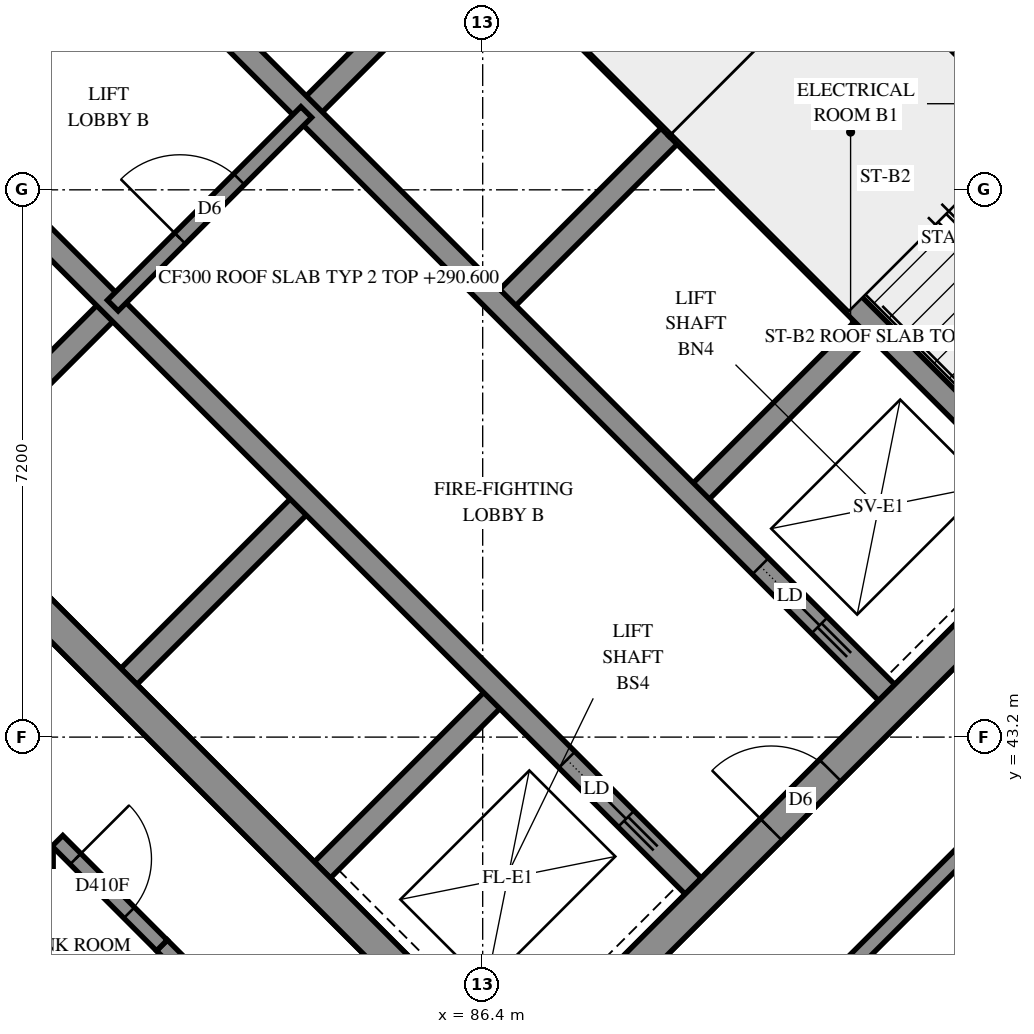
"""IFC4 building model, lengths in metres.
Left out: names, types, materials, properties, quantities, classifications, styles, units other than length and angle.
Written with IfcOpenShell. Run it as: python <this file> out.ifc"""

import sys

from ifc_helpers import new_model, si_unit, direction, frame, frame_2d, origin, place, context, subcontext, project, spatial, polyline, rectangle, outline, extrude, element, fill, save


model = new_model("IFC4")
c1 = context("Model", 3, precision=1e-05, world=origin(), true_north=direction((0.0, 1.0)))
c2 = subcontext(c1, "Body", "Model", "MODEL_VIEW")
j1 = project(units=[si_unit("LENGTHUNIT", "METRE"), si_unit("PLANEANGLEUNIT", "RADIAN")], contexts=[c1])
p1 = place(None, origin())
s1 = spatial("IfcSite", under=j1, at=p1, CompositionType="ELEMENT")
p2 = place(p1, origin())
s2 = spatial("IfcBuilding", under=s1, at=p2, CompositionType="ELEMENT")
p3 = place(p2, frame((0.0, 0.0, 290.6)))
s3 = spatial("IfcBuildingStorey", under=s2, at=p3, CompositionType="ELEMENT", Elevation=290.6)
p4 = place(p3, frame((76.23, 49.231, -0.3), z_axis=(0.0, 0.0, 1.0), x_axis=(0.7071034917, -0.7071100706, 0.0)))
e1 = element("IfcWall", 1, at=p4, inside=s3, PredefinedType="SHEAR", context=c2, shape_type="SweptSolid", body=[
    extrude(rectangle(XDim=15.2, YDim=0.4, at=frame_2d((7.6, 0.0))), origin(), (0.0, 0.0, 1.0), 3.1),
])
p5 = place(p3, frame((86.695, 59.696, -0.3), z_axis=(0.0, 0.0, 1.0), x_axis=(0.7071100706, -0.7071034917, 0.0)))
e2 = element("IfcWall", 2, at=p5, inside=s3, PredefinedType="SHEAR", context=c2, shape_type="SweptSolid", body=[
    extrude(rectangle(XDim=15.2, YDim=0.4, at=frame_2d((7.6, 0.0))), origin(), (0.0, 0.0, 1.0), 3.1),
])
p6 = place(p5, frame((10.4, 0.0, 0.3)))
e3 = element("IfcOpeningElement", 3, at=p6, cuts=e2, PredefinedType="OPENING", context=c2, shape_type="SweptSolid", body=[
    extrude(rectangle(XDim=0.8, YDim=2.1, at=frame_2d((0.4, 1.05))), frame((0.0, 0.21, 0.0), z_axis=(0.0, -1.0, 0.0), x_axis=(1.0, 0.0, 0.0)), (0.0, 0.0, 1.0), 0.42),
])
p7 = place(p3, frame((76.513, 49.231, -0.3), z_axis=(0.0, 0.0, 1.0), x_axis=(0.7071067812, 0.7071067812, 0.0)))
e4 = element("IfcWall", 4, at=p7, inside=s3, PredefinedType="SHEAR", context=c2, shape_type="SweptSolid", body=[
    extrude(rectangle(XDim=14.4, YDim=0.4, at=frame_2d((7.2, 0.0))), origin(), (0.0, 0.0, 1.0), 3.1),
])
p8 = place(p7, frame((4.55, 0.0, 0.3)))
e5 = element("IfcOpeningElement", 5, at=p8, cuts=e4, PredefinedType="OPENING", context=c2, shape_type="SweptSolid", body=[
    extrude(rectangle(XDim=1.1, YDim=2.1, at=frame_2d((0.55, 1.05))), frame((0.0, 0.21, 0.0), z_axis=(0.0, -1.0, 0.0), x_axis=(1.0, 0.0, 0.0)), (0.0, 0.0, 1.0), 0.42),
])
p9 = place(p7, frame((11.35, 0.0, 0.3)))
e6 = element("IfcOpeningElement", 6, at=p9, cuts=e4, PredefinedType="OPENING", context=c2, shape_type="SweptSolid", body=[
    extrude(rectangle(XDim=1.1, YDim=2.1, at=frame_2d((0.55, 1.05))), frame((0.0, 0.21, 0.0), z_axis=(0.0, -1.0, 0.0), x_axis=(1.0, 0.0, 0.0)), (0.0, 0.0, 1.0), 0.42),
])
p10 = place(p3, frame((86.978, 38.766, -0.3), z_axis=(0.0, 0.0, 1.0), x_axis=(0.7071067812, 0.7071067812, 0.0)))
e7 = element("IfcWall", 7, at=p10, inside=s3, PredefinedType="SHEAR", context=c2, shape_type="SweptSolid", body=[
    extrude(rectangle(XDim=14.4, YDim=0.4, at=frame_2d((7.2, 0.0))), origin(), (0.0, 0.0, 1.0), 3.1),
])
p11 = place(p10, frame((4.55, 0.0, 0.3)))
e8 = element("IfcOpeningElement", 8, at=p11, cuts=e7, PredefinedType="OPENING", context=c2, shape_type="SweptSolid", body=[
    extrude(rectangle(XDim=1.1, YDim=2.1, at=frame_2d((0.55, 1.05))), frame((0.0, 0.21, 0.0), z_axis=(0.0, -1.0, 0.0), x_axis=(1.0, 0.0, 0.0)), (0.0, 0.0, 1.0), 0.42),
])
p12 = place(p10, frame((11.35, 0.0, 0.3)))
e9 = element("IfcOpeningElement", 9, at=p12, cuts=e7, PredefinedType="OPENING", context=c2, shape_type="SweptSolid", body=[
    extrude(rectangle(XDim=1.1, YDim=2.1, at=frame_2d((0.55, 1.05))), frame((0.0, 0.21, 0.0), z_axis=(0.0, -1.0, 0.0), x_axis=(1.0, 0.0, 0.0)), (0.0, 0.0, 1.0), 0.42),
])
for number, where, z_axis, x_axis in (
    (10, (79.2, 46.544, 0.0), (0.0, 0.0, 1.0), (0.707, 0.707, 0.0)),
    (11, (84.079, 51.423, 0.0), (0.0, 0.0, 1.0), (0.707, 0.707, 0.0)),
):
    element("IfcWall", number, at=place(p3, frame(where, z_axis=z_axis, x_axis=x_axis)), inside=s3, PredefinedType="SOLIDWALL", context=c2, shape_type="SweptSolid", body=[
        extrude(rectangle(XDim=3.3, YDim=0.3, at=frame_2d((1.65, 0.0))), origin(), (0.0, 0.0, 1.0), 3.5),
    ])
p13 = place(p3, frame((81.746, 43.999, 0.0), z_axis=(0.0, 0.0, 1.0), x_axis=(0.7071067812, 0.7071067812, 0.0)))
e12 = element("IfcWall", 12, at=p13, inside=s3, PredefinedType="SOLIDWALL", context=c2, shape_type="SweptSolid", body=[
    extrude(rectangle(XDim=3.3, YDim=0.3, at=frame_2d((1.65, 0.0))), origin(), (0.0, 0.0, 1.0), 3.5),
])
p14 = place(p3, frame((86.625, 48.878, 0.0), z_axis=(0.0, 0.0, 1.0), x_axis=(0.7071067812, 0.7071067812, 0.0)))
e13 = element("IfcWall", 13, at=p14, inside=s3, PredefinedType="SOLIDWALL", context=c2, shape_type="SweptSolid", body=[
    extrude(rectangle(XDim=3.3, YDim=0.3, at=frame_2d((1.65, 0.0))), origin(), (0.0, 0.0, 1.0), 3.5),
])
p15 = place(p3, frame((84.291, 41.453, 0.0), z_axis=(0.0, 0.0, 1.0), x_axis=(0.7071067812, 0.7071067812, 0.0)))
e14 = element("IfcWall", 14, at=p15, inside=s3, PredefinedType="SOLIDWALL", context=c2, shape_type="SweptSolid", body=[
    extrude(rectangle(XDim=3.3, YDim=0.3, at=frame_2d((1.65, 0.0))), origin(), (0.0, 0.0, 1.0), 3.5),
])
p16 = place(p3, frame((89.17, 46.332, 0.0), z_axis=(0.0, 0.0, 1.0), x_axis=(0.7071067812, 0.7071067812, 0.0)))
e15 = element("IfcWall", 15, at=p16, inside=s3, PredefinedType="SOLIDWALL", context=c2, shape_type="SweptSolid", body=[
    extrude(rectangle(XDim=3.3, YDim=0.3, at=frame_2d((1.65, 0.0))), origin(), (0.0, 0.0, 1.0), 3.5),
])
p17 = place(p3, frame((78.988, 51.423, 0.0), z_axis=(0.0, 0.0, 1.0), x_axis=(0.7071067812, -0.7071067812, 0.0)))
e16 = element("IfcWall", 16, at=p17, inside=s3, PredefinedType="SOLIDWALL", context=c2, shape_type="SweptSolid", body=[
    extrude(rectangle(XDim=14.4, YDim=0.3, at=frame_2d((7.2, 0.0))), origin(), (0.0, 0.0, 1.0), 3.5),
])
p18 = place(p17, frame((12.05, 0.0, 0.0)))
e17 = element("IfcOpeningElement", 17, at=p18, cuts=e16, PredefinedType="OPENING", context=c2, shape_type="SweptSolid", body=[
    extrude(rectangle(XDim=1.1, YDim=2.1, at=frame_2d((0.55, 1.05))), frame((0.0, 0.16, 0.0), z_axis=(0.0, -1.0, 0.0), x_axis=(1.0, 0.0, 0.0)), (0.0, 0.0, 1.0), 0.32),
])
p19 = place(p3, frame((81.534, 53.969, 0.0), z_axis=(0.0, 0.0, 1.0), x_axis=(0.707103309, -0.7071102534, 0.0)))
e18 = element("IfcWall", 18, at=p19, inside=s3, PredefinedType="SOLIDWALL", context=c2, shape_type="SweptSolid", body=[
    extrude(rectangle(XDim=14.4, YDim=0.3, at=frame_2d((7.2, 0.0))), origin(), (0.0, 0.0, 1.0), 3.5),
])
p20 = place(p19, frame((12.05, 0.0, 0.0)))
e19 = element("IfcOpeningElement", 19, at=p20, cuts=e18, PredefinedType="OPENING", context=c2, shape_type="SweptSolid", body=[
    extrude(rectangle(XDim=1.1, YDim=2.1, at=frame_2d((0.55, 1.05))), frame((0.0, 0.16, 0.0), z_axis=(0.0, -1.0, 0.0), x_axis=(1.0, 0.0, 0.0)), (0.0, 0.0, 1.0), 0.32),
])
for number, where, z_axis, x_axis in (
    (20, (83.867, 56.302, 0.0), (0.0, 0.0, 1.0), (0.707, -0.707, 0.0)),
    (21, (88.958, 51.211, 0.0), (0.0, 0.0, 1.0), (0.707, -0.707, 0.0)),
):
    element("IfcWall", number, at=place(p3, frame(where, z_axis=z_axis, x_axis=x_axis)), inside=s3, PredefinedType="SOLIDWALL", context=c2, shape_type="SweptSolid", body=[
        extrude(rectangle(XDim=7.2, YDim=0.3, at=frame_2d((3.6, 0.0))), origin(), (0.0, 0.0, 1.0), 3.5),
    ])
p21 = place(p3, frame((88.958, 51.211, 0.0), z_axis=(0.0, 0.0, 1.0), x_axis=(0.7071067812, 0.7071067812, 0.0)))
e22 = element("IfcWall", 22, at=p21, inside=s3, PredefinedType="SOLIDWALL", context=c2, shape_type="SweptSolid", body=[
    extrude(rectangle(XDim=4.2, YDim=0.3, at=frame_2d((2.1, 0.0))), origin(), (0.0, 0.0, 1.0), 3.5),
])
p22 = place(p3, frame((89.382, 29.856, 0.0), z_axis=(0.0, 0.0, 1.0), x_axis=(0.7071094407, 0.7071041216, 0.0)))
e23 = element("IfcWall", 23, at=p22, inside=s3, PredefinedType="SOLIDWALL", context=c2, shape_type="SweptSolid", body=[
    extrude(outline(polyline([(-0.2, -0.2), (19.0, -0.2), (18.6, 0.2), (0.2, 0.2), (-0.2, -0.2)])), origin(), (0.0, 0.0, 1.0), 3.0),
])
p23 = place(p22, frame((1.9, 0.0, 0.7)))
e24 = element("IfcOpeningElement", 24, at=p23, cuts=e23, PredefinedType="OPENING", context=c2, shape_type="SweptSolid", body=[
    extrude(rectangle(XDim=1.8, YDim=2.2, at=frame_2d((0.9, 1.1))), frame((0.0, 0.21, 0.0), z_axis=(0.0, -1.0, 0.0), x_axis=(1.0, 0.0, 0.0)), (0.0, 0.0, 1.0), 0.42),
])
p24 = place(p22, frame((5.5, 0.0, 0.7)))
e25 = element("IfcOpeningElement", 25, at=p24, cuts=e23, PredefinedType="OPENING", context=c2, shape_type="SweptSolid", body=[
    extrude(rectangle(XDim=1.8, YDim=2.2, at=frame_2d((0.9, 1.1))), frame((0.0, 0.21, 0.0), z_axis=(0.0, -1.0, 0.0), x_axis=(1.0, 0.0, 0.0)), (0.0, 0.0, 1.0), 0.42),
])
p25 = place(p22, frame((8.95, 0.0, 0.7)))
e26 = element("IfcOpeningElement", 26, at=p25, cuts=e23, PredefinedType="OPENING", context=c2, shape_type="SweptSolid", body=[
    extrude(rectangle(XDim=1.8, YDim=2.2, at=frame_2d((0.9, 1.1))), frame((0.0, 0.21, 0.0), z_axis=(0.0, -1.0, 0.0), x_axis=(1.0, 0.0, 0.0)), (0.0, 0.0, 1.0), 0.42),
])
p26 = place(p22, frame((12.85, 0.0, 0.7)))
e27 = element("IfcOpeningElement", 27, at=p26, cuts=e23, PredefinedType="OPENING", context=c2, shape_type="SweptSolid", body=[
    extrude(rectangle(XDim=1.8, YDim=2.2, at=frame_2d((0.9, 1.1))), frame((0.0, 0.21, 0.0), z_axis=(0.0, -1.0, 0.0), x_axis=(1.0, 0.0, 0.0)), (0.0, 0.0, 1.0), 0.42),
])
p27 = place(p22, frame((16.0, 0.0, 0.7)))
e28 = element("IfcOpeningElement", 28, at=p27, cuts=e23, PredefinedType="OPENING", context=c2, shape_type="SweptSolid", body=[
    extrude(rectangle(XDim=1.8, YDim=2.2, at=frame_2d((0.9, 1.1))), frame((0.0, 0.21, 0.0), z_axis=(0.0, -1.0, 0.0), x_axis=(1.0, 0.0, 0.0)), (0.0, 0.0, 1.0), 0.42),
])
p28 = place(p3, frame((78.297, 40.941, 0.0), z_axis=(0.0, 0.0, 1.0), x_axis=(0.7071035917, -0.7071099707, 0.0)))
e29 = element("IfcWall", 29, at=p28, inside=s3, PredefinedType="SOLIDWALL", context=c2, shape_type="SweptSolid", body=[
    extrude(outline(polyline([(0.047, -0.2), (15.877, -0.2), (15.476, 0.2), (-0.047, 0.2), (0.047, -0.2)])), origin(), (0.0, 0.0, 1.0), 3.5),
])
p29 = place(p28, frame((1.138, 0.0, 0.7)))
e30 = element("IfcOpeningElement", 30, at=p29, cuts=e29, PredefinedType="OPENING", context=c2, shape_type="SweptSolid", body=[
    extrude(rectangle(XDim=1.8, YDim=2.2, at=frame_2d((0.9, 1.1))), frame((0.0, 0.21, 0.0), z_axis=(0.0, -1.0, 0.0), x_axis=(1.0, 0.0, 0.0)), (0.0, 0.0, 1.0), 0.42),
])
p30 = place(p28, frame((4.777, 0.0, 0.7)))
e31 = element("IfcOpeningElement", 31, at=p30, cuts=e29, PredefinedType="OPENING", context=c2, shape_type="SweptSolid", body=[
    extrude(rectangle(XDim=1.8, YDim=2.2, at=frame_2d((0.9, 1.1))), frame((0.0, 0.21, 0.0), z_axis=(0.0, -1.0, 0.0), x_axis=(1.0, 0.0, 0.0)), (0.0, 0.0, 1.0), 0.42),
])
p31 = place(p28, frame((8.377, 0.0, 0.7)))
e32 = element("IfcOpeningElement", 32, at=p31, cuts=e29, PredefinedType="OPENING", context=c2, shape_type="SweptSolid", body=[
    extrude(rectangle(XDim=1.8, YDim=2.2, at=frame_2d((0.9, 1.1))), frame((0.0, 0.21, 0.0), z_axis=(0.0, -1.0, 0.0), x_axis=(1.0, 0.0, 0.0)), (0.0, 0.0, 1.0), 0.42),
])
p32 = place(p28, frame((11.976, 0.0, 0.7)))
e33 = element("IfcOpeningElement", 33, at=p32, cuts=e29, PredefinedType="OPENING", context=c2, shape_type="SweptSolid", body=[
    extrude(rectangle(XDim=1.8, YDim=2.2, at=frame_2d((0.9, 1.1))), frame((0.0, 0.21, 0.0), z_axis=(0.0, -1.0, 0.0), x_axis=(1.0, 0.0, 0.0)), (0.0, 0.0, 1.0), 0.42),
])
p33 = place(p3, frame((91.313, 53.354, 0.0), z_axis=(0.0, 0.0, 1.0), x_axis=(0.7071147811, -0.7070987812, 0.0)))
e34 = element("IfcWall", 34, at=p33, inside=s3, PredefinedType="PARTITIONING", context=c2, shape_type="SweptSolid", body=[
    extrude(rectangle(XDim=6.25, YDim=0.15, at=frame_2d((3.125, 0.0))), origin(), (0.0, 0.0, 1.0), 3.5),
])
p34 = place(p3, frame((81.534, 48.878, 0.0), z_axis=(0.0, 0.0, 1.0), x_axis=(0.707092892, 0.7071206701, 0.0)))
e35 = element("IfcWall", 35, at=p34, inside=s3, PredefinedType="PARTITIONING", context=c2, shape_type="SweptSolid", body=[
    extrude(rectangle(XDim=3.6, YDim=0.2, at=frame_2d((1.8, 0.0))), origin(), (0.0, 0.0, 1.0), 3.5),
])
p35 = place(p34, frame((1.25, 0.0, 0.0)))
e36 = element("IfcOpeningElement", 36, at=p35, cuts=e35, PredefinedType="OPENING", context=c2, shape_type="SweptSolid", body=[
    extrude(rectangle(XDim=1.1, YDim=2.1, at=frame_2d((0.55, 1.05))), frame((0.0, 0.11, 0.0), z_axis=(0.0, -1.0, 0.0), x_axis=(1.0, 0.0, 0.0)), (0.0, 0.0, 1.0), 0.22),
])
p36 = place(p3, frame((86.833, 62.381, 0.0), z_axis=(0.0, 0.0, 1.0), x_axis=(0.7071067812, -0.7071067812, 0.0)))
e37 = element("IfcWall", 37, at=p36, inside=s3, PredefinedType="PARTITIONING", context=c2, shape_type="SweptSolid", body=[
    extrude(rectangle(XDim=18.801, YDim=0.2, at=frame_2d((9.4, 0.0))), origin(), (0.0, 0.0, 1.0), 3.5),
])
p37 = place(p36, frame((4.276, 0.0, 0.0)))
e38 = element("IfcOpeningElement", 38, at=p37, cuts=e37, PredefinedType="OPENING", context=c2, shape_type="SweptSolid", body=[
    extrude(rectangle(XDim=1.0, YDim=2.1, at=frame_2d((0.5, 1.05))), frame((0.0, 0.11, 0.0), z_axis=(0.0, -1.0, 0.0), x_axis=(1.0, 0.0, 0.0)), (0.0, 0.0, 1.0), 0.22),
])
p38 = place(p36, frame((6.326, 0.0, 0.0)))
e39 = element("IfcOpeningElement", 39, at=p38, cuts=e37, PredefinedType="OPENING", context=c2, shape_type="SweptSolid", body=[
    extrude(rectangle(XDim=1.0, YDim=2.1, at=frame_2d((0.5, 1.05))), frame((0.0, 0.11, 0.0), z_axis=(0.0, -1.0, 0.0), x_axis=(1.0, 0.0, 0.0)), (0.0, 0.0, 1.0), 0.22),
])
p39 = place(p36, frame((11.476, 0.0, 0.0)))
e40 = element("IfcOpeningElement", 40, at=p39, cuts=e37, PredefinedType="OPENING", context=c2, shape_type="SweptSolid", body=[
    extrude(rectangle(XDim=1.0, YDim=2.1, at=frame_2d((0.5, 1.05))), frame((0.0, 0.11, 0.0), z_axis=(0.0, -1.0, 0.0), x_axis=(1.0, 0.0, 0.0)), (0.0, 0.0, 1.0), 0.22),
])
p40 = place(p36, frame((13.526, 0.0, 0.0)))
e41 = element("IfcOpeningElement", 41, at=p40, cuts=e37, PredefinedType="OPENING", context=c2, shape_type="SweptSolid", body=[
    extrude(rectangle(XDim=1.0, YDim=2.1, at=frame_2d((0.5, 1.05))), frame((0.0, 0.11, 0.0), z_axis=(0.0, -1.0, 0.0), x_axis=(1.0, 0.0, 0.0)), (0.0, 0.0, 1.0), 0.22),
])
p41 = place(p3, frame((86.835, 35.797, 0.0), z_axis=(0.0, 0.0, 1.0), x_axis=(0.7071067812, 0.7071067812, 0.0)))
e42 = element("IfcWall", 42, at=p41, inside=s3, PredefinedType="PARTITIONING", context=c2, shape_type="SweptSolid", body=[
    extrude(rectangle(XDim=8.499, YDim=0.2, at=frame_2d((4.25, 0.0))), origin(), (0.0, 0.0, 1.0), 3.5),
])
p42 = place(p3, frame((82.18, 40.46, 0.0), z_axis=(0.0, 0.0, 1.0), x_axis=(0.7071067812, -0.7071067812, 0.0)))
e43 = element("IfcWall", 43, at=p42, inside=s3, PredefinedType="PARTITIONING", context=c2, shape_type="SweptSolid", body=[
    extrude(rectangle(XDim=4.391, YDim=0.2, at=frame_2d((2.196, 0.0))), origin(), (0.0, 0.0, 1.0), 3.5),
])
p43 = place(p42, frame((1.316, 0.0, 0.0)))
e44 = element("IfcOpeningElement", 44, at=p43, cuts=e43, PredefinedType="OPENING", context=c2, shape_type="SweptSolid", body=[
    extrude(rectangle(XDim=1.0, YDim=2.1, at=frame_2d((0.5, 1.05))), frame((0.0, 0.11, 0.0), z_axis=(0.0, -1.0, 0.0), x_axis=(1.0, 0.0, 0.0)), (0.0, 0.0, 1.0), 0.22),
])
p44 = place(p3, frame((77.602, 41.6, 0.0), z_axis=(0.0, 0.0, 1.0), x_axis=(1.0, 0.0, 0.0)))
e45 = element("IfcWall", 45, at=p44, inside=s3, PredefinedType="PARTITIONING", context=c2, shape_type="SweptSolid", body=[
    extrude(rectangle(XDim=3.148, YDim=0.2, at=frame_2d((1.574, 0.0))), origin(), (0.0, 0.0, 1.0), 3.5),
])
p45 = place(p3, frame((80.805, 41.835, 0.0), z_axis=(0.0, 0.0, 1.0), x_axis=(0.7065923348, -0.7076208535, 0.0)))
e46 = element("IfcWall", 46, at=p45, inside=s3, PredefinedType="PARTITIONING", context=c2, shape_type="SweptSolid", body=[
    extrude(rectangle(XDim=1.944, YDim=0.2, at=frame_2d((0.972, 0.0))), origin(), (0.0, 0.0, 1.0), 3.5),
])
p46 = place(p45, frame((0.336, 0.0, 0.0)))
e47 = element("IfcOpeningElement", 47, at=p46, cuts=e46, PredefinedType="OPENING", context=c2, shape_type="SweptSolid", body=[
    extrude(rectangle(XDim=1.0, YDim=2.1, at=frame_2d((0.5, 1.05))), frame((0.0, 0.11, 0.0), z_axis=(0.0, -1.0, 0.0), x_axis=(1.0, 0.0, 0.0)), (0.0, 0.0, 1.0), 0.22),
])
p47 = place(p3, frame((86.271, 33.251, 0.0), z_axis=(0.0, 0.0, 1.0), x_axis=(0.7071908866, 0.7070226658, 0.0)))
e48 = element("IfcWall", 48, at=p47, inside=s3, PredefinedType="PARTITIONING", context=c2, shape_type="SweptSolid", body=[
    extrude(outline(polyline([(0.0, -0.1), (10.7, -0.1), (10.7, 0.1), (0.0, 0.1), (0.0, -0.1)])), origin(), (0.0, 0.0, 1.0), 3.5),
])
p48 = place(p11, origin())
e49 = element("IfcDoor", 49, at=p48, inside=s3, OperationType="DOUBLE_DOOR_SINGLE_SWING", PredefinedType="DOOR", context=c2, shape_type="SweptSolid", body=[
    extrude(rectangle(XDim=1.1, YDim=2.1, at=frame_2d((0.55, 1.05))), frame((0.0, 0.025, 0.0), z_axis=(0.0, -1.0, 0.0), x_axis=(1.0, 0.0, 0.0)), (0.0, 0.0, 1.0), 0.05),
])
fill(e8, e49)
p49 = place(p35, origin())
e50 = element("IfcDoor", 50, at=p49, inside=s3, OperationType="DOUBLE_DOOR_SINGLE_SWING", PredefinedType="DOOR", context=c2, shape_type="SweptSolid", body=[
    extrude(rectangle(XDim=1.1, YDim=2.1, at=frame_2d((0.55, 1.05))), frame((0.0, 0.025, 0.0), z_axis=(0.0, -1.0, 0.0), x_axis=(1.0, 0.0, 0.0)), (0.0, 0.0, 1.0), 0.05),
])
fill(e36, e50)
p50 = place(p18, origin())
e51 = element("IfcDoor", 51, at=p50, inside=s3, OperationType="SLIDING_TO_RIGHT", PredefinedType="DOOR", context=c2, shape_type="SweptSolid", body=[
    extrude(rectangle(XDim=1.1, YDim=2.1, at=frame_2d((0.55, 1.05))), frame((0.0, 0.025, 0.0), z_axis=(0.0, -1.0, 0.0), x_axis=(1.0, 0.0, 0.0)), (0.0, 0.0, 1.0), 0.05),
])
fill(e17, e51)
p51 = place(p20, origin())
e52 = element("IfcDoor", 52, at=p51, inside=s3, OperationType="SLIDING_TO_RIGHT", PredefinedType="DOOR", context=c2, shape_type="SweptSolid", body=[
    extrude(rectangle(XDim=1.1, YDim=2.1, at=frame_2d((0.55, 1.05))), frame((0.0, 0.025, 0.0), z_axis=(0.0, -1.0, 0.0), x_axis=(1.0, 0.0, 0.0)), (0.0, 0.0, 1.0), 0.05),
])
fill(e19, e52)
p52 = place(p46, origin())
e53 = element("IfcDoor", 53, at=p52, inside=s3, OperationType="SINGLE_SWING_LEFT", PredefinedType="DOOR", context=c2, shape_type="SweptSolid", body=[
    extrude(rectangle(XDim=1.0, YDim=2.1, at=frame_2d((0.5, 1.05))), frame((0.0, 0.025, 0.0), z_axis=(0.0, -1.0, 0.0), x_axis=(1.0, 0.0, 0.0)), (0.0, 0.0, 1.0), 0.05),
])
fill(e47, e53)
save(model, sys.argv[1])
